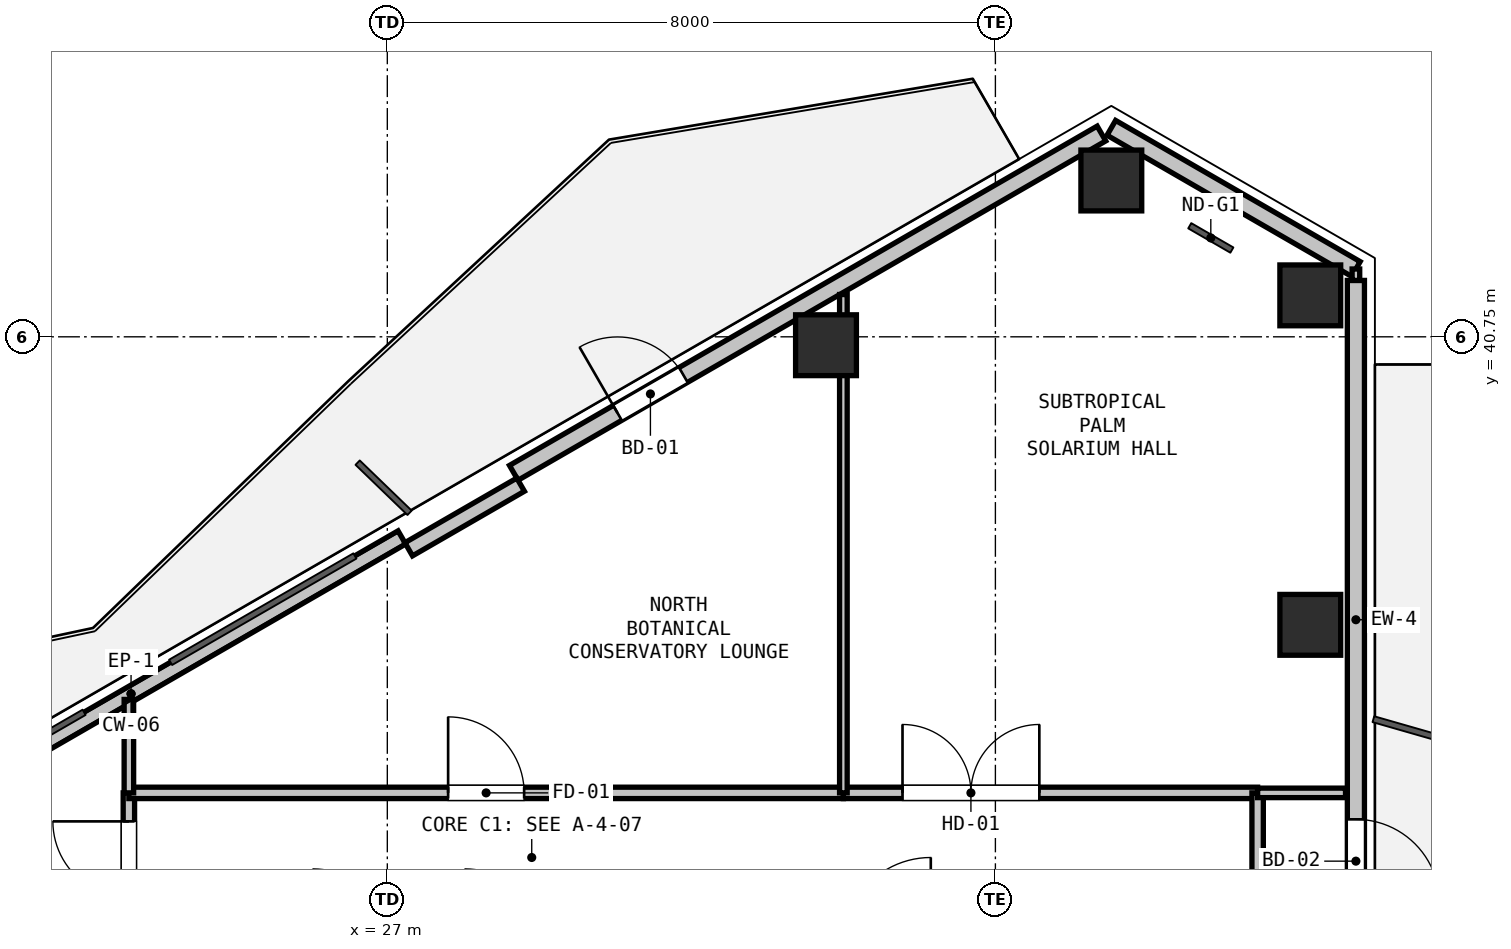
"""IFC4 building model, lengths in metres.
Left out: names, types, materials, properties, quantities, classifications, styles, units other than length and angle.
Written with IfcOpenShell. Run it as: python <this file> out.ifc"""

import sys

from ifc_helpers import new_model, si_unit, direction, frame, frame_2d, origin, origin_2d, place, context, subcontext, project, spatial, rectangle, hollow_rectangle, extrude, element, fill, save


model = new_model("IFC4")
c1 = context("Model", 3, precision=1e-05, world=origin(), true_north=direction((0.0, 1.0)))
c2 = subcontext(c1, "Body", "Model", "MODEL_VIEW")
j1 = project(units=[si_unit("LENGTHUNIT", "METRE"), si_unit("PLANEANGLEUNIT", "RADIAN")], contexts=[c1])
p1 = place(None, origin())
s1 = spatial("IfcSite", under=j1, at=p1, CompositionType="ELEMENT")
p2 = place(p1, origin())
s2 = spatial("IfcBuilding", under=s1, at=p2, CompositionType="ELEMENT")
p3 = place(p2, frame((0.0, 0.0, 254.1)))
s3 = spatial("IfcBuildingStorey", under=s2, at=p3, CompositionType="ELEMENT", Elevation=254.1)
for number, where, z_axis, x_axis in (
    (1, (32.771, 40.639, 0.0), (0.0, 0.0, 1.0), (1.0, 0.0, 0.0)),
    (2, (36.525, 42.807, 0.0), (0.0, 0.0, 1.0), (1.0, 0.0, 0.0)),
    (3, (39.143, 41.295, 0.0), (0.0, 0.0, 1.0), (1.0, 0.0, 0.0)),
    (4, (39.143, 36.961, 0.0), (0.0, 0.0, 1.0), (1.0, 0.0, 0.0)),
):
    element("IfcColumn", number, at=place(p3, frame(where, z_axis=z_axis, x_axis=x_axis)), inside=s3, PredefinedType="COLUMN", context=c2, shape_type="SweptSolid", body=[
        extrude(hollow_rectangle(XDim=0.8, YDim=0.8, WallThickness=0.025, at=origin_2d()), origin(), (0.0, 0.0, 1.0), 4.5),
    ])
p4 = place(p3, frame((36.525, 43.5, 0.0), z_axis=(0.0, 0.0, 1.0), x_axis=(0.866038962515, -0.499976514854, 0.0)))
e5 = element("IfcWall", 5, at=p4, inside=s3, PredefinedType="SOLIDWALL", context=c2, shape_type="SweptSolid", body=[
    extrude(rectangle(XDim=3.716, YDim=0.225, at=frame_2d((1.858, 0.0))), origin(), (0.0, 0.0, 1.0), 3.8),
])
p5 = place(p3, frame((20.066, 33.997, 0.0), z_axis=(0.0, 0.0, 1.0), x_axis=(0.866019557082, 0.500010126649, 0.0)))
e6 = element("IfcWall", 6, at=p5, inside=s3, PredefinedType="PARAPET", context=c2, shape_type="SweptSolid", body=[
    extrude(rectangle(XDim=8.228, YDim=0.2, at=frame_2d((4.114, 0.0))), origin(), (0.0, 0.0, 1.0), 0.2),
])
p6 = place(p3, frame((28.664, 38.96, 0.0), z_axis=(0.0, 0.0, 1.0), x_axis=(0.866026655105, 0.499997832642, 0.0)))
e7 = element("IfcWall", 7, at=p6, inside=s3, PredefinedType="SOLIDWALL", context=c2, shape_type="SweptSolid", body=[
    extrude(rectangle(XDim=8.928, YDim=0.225, at=frame_2d((4.464, 0.0))), origin(), (0.0, 0.0, 1.0), 3.8),
])
p7 = place(p6, frame((1.576, 0.0, 0.0)))
e8 = element("IfcOpeningElement", 8, at=p7, cuts=e7, PredefinedType="OPENING", context=c2, shape_type="SweptSolid", body=[
    extrude(rectangle(XDim=1.0, YDim=2.1, at=frame_2d((0.5, 1.05))), frame((0.0, 0.123, 0.0), z_axis=(0.0, -1.0, 0.0), x_axis=(1.0, 0.0, 0.0)), (0.0, 0.0, 1.0), 0.245),
])
p8 = place(p3, frame((27.281, 37.955, 0.0), z_axis=(0.0, 0.0, 1.0), x_axis=(0.866025371046, 0.500000056704, 0.0)))
e9 = element("IfcWall", 9, at=p8, inside=s3, PredefinedType="PARAPET", context=c2, shape_type="SweptSolid", body=[
    extrude(rectangle(XDim=1.7, YDim=0.2, at=frame_2d((0.85, 0.0))), origin(), (0.0, 0.0, 1.0), 3.8),
])
p9 = place(p3, frame((39.743, 41.492, 0.0), z_axis=(0.0, 0.0, 1.0), x_axis=(0.0, -1.0, 0.0)))
e10 = element("IfcWall", 10, at=p9, inside=s3, PredefinedType="SOLIDWALL", context=c2, shape_type="SweptSolid", body=[
    extrude(rectangle(XDim=8.928, YDim=0.225, at=frame_2d((4.464, 0.0))), origin(), (0.0, 0.0, 1.0), 3.8),
])
p10 = place(p9, frame((7.09, 0.0, 0.0)))
e11 = element("IfcOpeningElement", 11, at=p10, cuts=e10, PredefinedType="OPENING", context=c2, shape_type="SweptSolid", body=[
    extrude(rectangle(XDim=1.1, YDim=2.1, at=frame_2d((0.55, 1.05))), frame((0.0, 0.123, 0.0), z_axis=(0.0, -1.0, 0.0), x_axis=(1.0, 0.0, 0.0)), (0.0, 0.0, 1.0), 0.245),
])
p11 = place(p3, frame((23.6, 33.0, 0.0), z_axis=(0.0, 0.0, 1.0), x_axis=(0.0, 1.0, 0.0)))
e12 = element("IfcWall", 12, at=p11, inside=s3, PredefinedType="PARTITIONING", context=c2, shape_type="SweptSolid", body=[
    extrude(rectangle(XDim=1.75, YDim=0.15, at=frame_2d((0.875, 0.0))), origin(), (0.0, 0.0, 1.0), 3.705),
])
p12 = place(p11, frame((0.375, 0.0, 0.0)))
e13 = element("IfcOpeningElement", 13, at=p12, cuts=e12, PredefinedType="OPENING", context=c2, shape_type="SweptSolid", body=[
    extrude(rectangle(XDim=1.0, YDim=2.15, at=frame_2d((0.5, 1.075))), frame((0.0, 0.085, 0.0), z_axis=(0.0, -1.0, 0.0), x_axis=(1.0, 0.0, 0.0)), (0.0, 0.0, 1.0), 0.17),
])
p13 = place(p3, frame((23.6, 34.75, 0.0), z_axis=(0.0, 0.0, 1.0), x_axis=(1.0, 0.0, 0.0)))
e14 = element("IfcWall", 14, at=p13, inside=s3, PredefinedType="PARTITIONING", context=c2, shape_type="SweptSolid", body=[
    extrude(rectangle(XDim=9.4, YDim=0.15, at=frame_2d((4.7, 0.0))), origin(), (0.0, 0.0, 1.0), 4.18),
])
p14 = place(p13, frame((4.2, 0.0, 0.0)))
e15 = element("IfcOpeningElement", 15, at=p14, cuts=e14, PredefinedType="OPENING", context=c2, shape_type="SweptSolid", body=[
    extrude(rectangle(XDim=1.0, YDim=2.15, at=frame_2d((0.5, 1.075))), frame((0.0, 0.085, 0.0), z_axis=(0.0, -1.0, 0.0), x_axis=(1.0, 0.0, 0.0)), (0.0, 0.0, 1.0), 0.17),
])
p15 = place(p3, frame((33.0, 34.75, 0.0), z_axis=(0.0, 0.0, 1.0), x_axis=(1.0, 0.0, 0.0)))
e16 = element("IfcWall", 16, at=p15, inside=s3, PredefinedType="PARTITIONING", context=c2, shape_type="SweptSolid", body=[
    extrude(rectangle(XDim=5.45, YDim=0.15, at=frame_2d((2.725, 0.0))), origin(), (0.0, 0.0, 1.0), 3.628),
])
p16 = place(p15, frame((0.778, 0.0, 0.0)))
e17 = element("IfcOpeningElement", 17, at=p16, cuts=e16, PredefinedType="OPENING", context=c2, shape_type="SweptSolid", body=[
    extrude(rectangle(XDim=1.8, YDim=2.2, at=frame_2d((0.9, 1.1))), frame((0.0, 0.085, 0.0), z_axis=(0.0, -1.0, 0.0), x_axis=(1.0, 0.0, 0.0)), (0.0, 0.0, 1.0), 0.17),
])
p17 = place(p3, frame((38.45, 34.75, 0.0), z_axis=(0.0, 0.0, 1.0), x_axis=(0.0, -1.0, 0.0)))
e18 = element("IfcWall", 18, at=p17, inside=s3, PredefinedType="PARTITIONING", context=c2, shape_type="SweptSolid", body=[
    extrude(rectangle(XDim=16.0, YDim=0.15, at=frame_2d((8.0, 0.0))), origin(), (0.0, 0.0, 1.0), 4.18),
])
p18 = place(p17, frame((7.1, 0.0, 0.0)))
e19 = element("IfcOpeningElement", 19, at=p18, cuts=e18, PredefinedType="OPENING", context=c2, shape_type="SweptSolid", body=[
    extrude(rectangle(XDim=1.8, YDim=2.2, at=frame_2d((0.9, 1.1))), frame((0.0, 0.085, 0.0), z_axis=(0.0, -1.0, 0.0), x_axis=(1.0, 0.0, 0.0)), (0.0, 0.0, 1.0), 0.17),
])
p19 = place(p3, frame((23.6, 34.75, 0.0), z_axis=(0.0, 0.0, 1.0), x_axis=(0.0, 1.0, 0.0)))
e20 = element("IfcWall", 20, at=p19, inside=s3, PredefinedType="PARTITIONING", context=c2, shape_type="SweptSolid", body=[
    extrude(rectangle(XDim=1.229, YDim=0.125, at=frame_2d((0.615, 0.0))), origin(), (0.0, 0.0, 1.0), 2.365),
])
p20 = place(p3, frame((33.0, 41.306, 0.0), z_axis=(0.0, 0.0, 1.0), x_axis=(0.0, -1.0, 0.0)))
e21 = element("IfcWall", 21, at=p20, inside=s3, PredefinedType="PARTITIONING", context=c2, shape_type="SweptSolid", body=[
    extrude(rectangle(XDim=6.556, YDim=0.1, at=frame_2d((3.278, 0.0))), origin(), (0.0, 0.0, 1.0), 4.18),
])
p21 = place(p3, frame((39.606, 34.75, 0.0), z_axis=(0.0, 0.0, 1.0), x_axis=(-1.0, 0.0, 0.0)))
e22 = element("IfcWall", 22, at=p21, inside=s3, PredefinedType="PARTITIONING", context=c2, shape_type="SweptSolid", body=[
    extrude(rectangle(XDim=1.156, YDim=0.125, at=frame_2d((0.578, 0.0))), origin(), (0.0, 0.0, 1.0), 2.365),
])
p22 = place(p3, frame((39.743, 41.642, 0.0), z_axis=(0.0, 0.0, 1.0), x_axis=(0.0, -1.0, 0.0)))
e23 = element("IfcWall", 23, at=p22, inside=s3, PredefinedType="PARTITIONING", context=c2, shape_type="SweptSolid", body=[
    extrude(rectangle(XDim=0.15, YDim=0.1, at=frame_2d((0.075, 0.0))), origin(), (0.0, 0.0, 1.0), 4.18),
])
p23 = place(p7, origin())
e24 = element("IfcDoor", 24, at=p23, inside=s3, OperationType="SINGLE_SWING_LEFT", PredefinedType="DOOR", context=c2, shape_type="SweptSolid", body=[
    extrude(rectangle(XDim=1.0, YDim=2.1, at=frame_2d((0.5, 1.05))), frame((0.0, 0.025, 0.0), z_axis=(0.0, -1.0, 0.0), x_axis=(1.0, 0.0, 0.0)), (0.0, 0.0, 1.0), 0.05),
])
fill(e8, e24)
p24 = place(p10, origin())
e25 = element("IfcDoor", 25, at=p24, inside=s3, OperationType="SINGLE_SWING_RIGHT", PredefinedType="DOOR", context=c2, shape_type="SweptSolid", body=[
    extrude(rectangle(XDim=1.1, YDim=2.1, at=frame_2d((0.55, 1.05))), frame((0.0, 0.025, 0.0), z_axis=(0.0, -1.0, 0.0), x_axis=(1.0, 0.0, 0.0)), (0.0, 0.0, 1.0), 0.05),
])
fill(e11, e25)
p25 = place(p14, origin())
e26 = element("IfcDoor", 26, at=p25, inside=s3, OperationType="SINGLE_SWING_LEFT", PredefinedType="DOOR", context=c2, shape_type="SweptSolid", body=[
    extrude(rectangle(XDim=1.0, YDim=2.15, at=frame_2d((0.5, 1.075))), frame((0.0, 0.025, 0.0), z_axis=(0.0, -1.0, 0.0), x_axis=(1.0, 0.0, 0.0)), (0.0, 0.0, 1.0), 0.05),
])
fill(e15, e26)
p26 = place(p16, origin())
e27 = element("IfcDoor", 27, at=p26, inside=s3, OperationType="DOUBLE_DOOR_SINGLE_SWING", PredefinedType="DOOR", context=c2, shape_type="SweptSolid", body=[
    extrude(rectangle(XDim=1.8, YDim=2.2, at=frame_2d((0.9, 1.1))), frame((0.0, 0.025, 0.0), z_axis=(0.0, -1.0, 0.0), x_axis=(1.0, 0.0, 0.0)), (0.0, 0.0, 1.0), 0.05),
])
fill(e17, e27)
p27 = place(p12, origin())
e28 = element("IfcDoor", 28, at=p27, inside=s3, OperationType="SINGLE_SWING_RIGHT", PredefinedType="DOOR", context=c2, shape_type="SweptSolid", body=[
    extrude(rectangle(XDim=1.0, YDim=2.15, at=frame_2d((0.5, 1.075))), frame((0.0, 0.025, 0.0), z_axis=(0.0, -1.0, 0.0), x_axis=(1.0, 0.0, 0.0)), (0.0, 0.0, 1.0), 0.05),
])
fill(e13, e28)
save(model, sys.argv[1])
